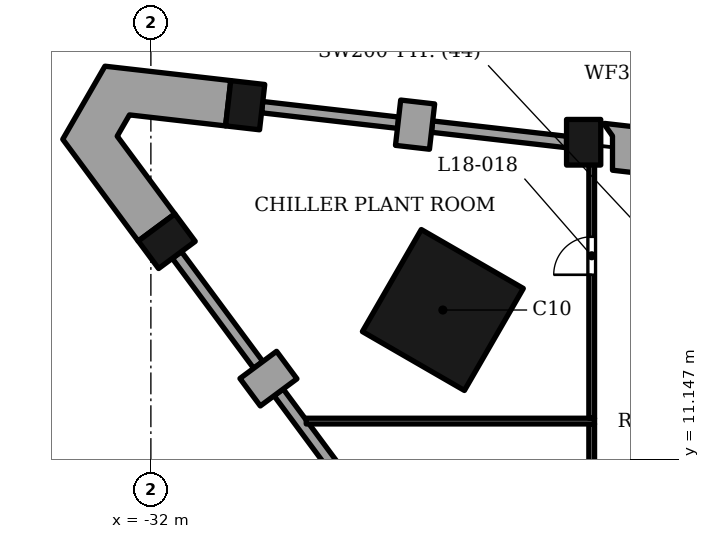
"""IFC4 building model, lengths in metres.
Left out: names, types, materials, properties, quantities, classifications, styles, units other than length and angle.
Written with IfcOpenShell. Run it as: python <this file> out.ifc"""

import sys

from ifc_helpers import new_model, si_unit, direction, frame, frame_2d, origin, origin_2d, place, context, subcontext, project, spatial, polyline, rectangle, outline, extrude, clip, halfspace, element, fill, save


model = new_model("IFC4")
c1 = context("Model", 3, precision=1e-05, world=origin(), true_north=direction((0.0, 1.0)))
c2 = subcontext(c1, "Body", "Model", "MODEL_VIEW")
j1 = project(units=[si_unit("LENGTHUNIT", "METRE"), si_unit("PLANEANGLEUNIT", "RADIAN")], contexts=[c1])
p1 = place(None, origin())
s1 = spatial("IfcSite", under=j1, at=p1, CompositionType="ELEMENT")
p2 = place(p1, origin())
s2 = spatial("IfcBuilding", under=s1, at=p2, CompositionType="ELEMENT")
p3 = place(p2, frame((0.0, 0.0, 86.8)))
s3 = spatial("IfcBuildingStorey", under=s2, at=p3, CompositionType="ELEMENT", Elevation=86.8)
for number, where, z_axis, x_axis in (
    (1, (-29.519, 20.462, 0.0), (0.0, 0.0, 1.0), (-0.994, 0.114, 0.0)),
    (2, (-31.583, 16.883, 0.0), (0.0, 0.0, 1.0), (0.595, -0.804, 0.0)),
):
    element("IfcColumn", number, at=place(p3, frame(where, z_axis=z_axis, x_axis=x_axis)), inside=s3, PredefinedType="COLUMN", context=c2, shape_type="SweptSolid", body=[
        extrude(rectangle(XDim=0.9, YDim=1.2, at=origin_2d()), origin(), (0.0, 0.0, 1.0), 5.0),
    ])
p4 = place(p3, frame((-24.317, 15.073, 0.0), z_axis=(0.0, 0.0, 1.0), x_axis=(0.866025412511, -0.499999984885, 0.0)))
e3 = element("IfcColumn", 3, at=p4, inside=s3, PredefinedType="COLUMN", context=c2, shape_type="SweptSolid", body=[
    extrude(rectangle(XDim=3.1, YDim=3.1, at=origin_2d()), origin(), (0.0, 0.0, 1.0), 5.0),
])
p5 = place(p3, frame((-20.612, 19.487, 0.0), z_axis=(0.061468302485, -0.086327521183, 0.994368747938), x_axis=(0.814599345858, 0.580024056162, 0.0)))
e4 = element("IfcColumn", 4, at=p5, inside=s3, PredefinedType="COLUMN", context=c2, shape_type="Clipping", body=[
    clip(clip(extrude(rectangle(XDim=0.9, YDim=1.2, at=origin_2d()), origin(), (0.0, 0.0, 1.0), 5.028), halfspace(frame((0.0, 0.0, 0.068), z_axis=(0.0, 0.0, 1.0), x_axis=(1.0, 0.0, 0.0)), True)), halfspace(frame((0.0, 0.0, 4.96), z_axis=(0.0, 0.0, 1.0), x_axis=(1.0, 0.0, 0.0)), False)),
])
p6 = place(p3, frame((-26.259, 9.556, 0.0), z_axis=(0.098413977447, 0.296911537989, 0.949820102784), x_axis=(-0.949215713653, 0.314626014428, 0.0)))
e5 = element("IfcColumn", 5, at=p6, inside=s3, PredefinedType="COLUMN", context=c2, shape_type="Clipping", body=[
    clip(clip(extrude(rectangle(XDim=0.9, YDim=1.2, at=origin_2d()), origin(), (0.0, 0.0, 1.0), 5.264), halfspace(frame((0.0, 0.0, 0.202), z_axis=(0.0, 0.0, 1.0), x_axis=(1.0, 0.0, 0.0)), True)), halfspace(frame((0.0, 0.0, 5.062), z_axis=(0.0, 0.0, 1.0), x_axis=(1.0, 0.0, 0.0)), False)),
])
p7 = place(p3, frame((-25.116, 19.354, 0.0), z_axis=(0.0, 0.0, 1.0), x_axis=(0.113735952551, 0.993511013073, 0.0)))
e6 = element("IfcWall", 6, at=p7, inside=s3, PredefinedType="SOLIDWALL", context=c2, shape_type="SweptSolid", body=[
    extrude(rectangle(XDim=1.2, YDim=0.9, at=frame_2d((0.6, 0.0))), origin(), (0.0, 0.0, 1.0), 3.5),
])
p8 = place(p3, origin())
e7 = element("IfcWall", 7, at=p8, inside=s3, PredefinedType="ELEMENTEDWALL", context=c2, shape_type="SweptSolid", body=[
    extrude(outline(polyline([(-24.618, 19.75), (-21.062, 19.343), (-21.062, 19.645), (-24.584, 20.048), (-24.618, 19.75)])), origin(), (0.0, 0.0, 1.0), 3.5),
])
p9 = place(p3, frame((-25.495, 20.001, 0.0), z_axis=(0.0, 0.0, 1.0), x_axis=(-0.993511890309, 0.113728289423, 0.0)))
e8 = element("IfcWall", 8, at=p9, inside=s3, PredefinedType="ELEMENTEDWALL", context=c2, shape_type="SweptSolid", body=[
    extrude(rectangle(XDim=3.6, YDim=0.3, at=frame_2d((1.8, 0.0))), origin(), (0.0, 0.0, 1.0), 3.5),
])
p10 = place(p3, frame((-29.388, 12.91, 0.0), z_axis=(0.0, 0.0, 1.0), x_axis=(0.803477891264, 0.595334593527, 0.0)))
e9 = element("IfcWall", 9, at=p10, inside=s3, PredefinedType="SOLIDWALL", context=c2, shape_type="SweptSolid", body=[
    extrude(rectangle(XDim=1.2, YDim=0.9, at=frame_2d((0.6, 0.0))), origin(), (0.0, 0.0, 1.0), 3.5),
])
p11 = place(p3, origin())
e10 = element("IfcWall", 10, at=p11, inside=s3, PredefinedType="ELEMENTEDWALL", context=c2, shape_type="SweptSolid", body=[
    extrude(outline(polyline([(-29.054, 13.718), (-31.196, 16.61), (-31.437, 16.431), (-29.295, 13.54), (-29.054, 13.718)])), origin(), (0.0, 0.0, 1.0), 3.5),
])
p12 = place(p3, origin())
e11 = element("IfcWall", 11, at=p12, inside=s3, PredefinedType="ELEMENTEDWALL", context=c2, shape_type="SweptSolid", body=[
    extrude(outline(polyline([(-28.759, 12.816), (-26.709, 10.049), (-26.709, 10.156), (-26.618, 10.43), (-28.518, 12.995), (-28.759, 12.816)])), origin(), (0.0, 0.0, 1.0), 3.5),
])
p13 = place(p3, origin())
e12 = element("IfcWall", 12, at=p13, inside=s3, PredefinedType="SOLIDWALL", context=c2, shape_type="SweptSolid", body=[
    extrude(outline(polyline([(-19.853, 18.751), (-18.0, 18.539), (-18.0, 19.052), (-17.21, 19.052), (-17.142, 19.649), (-20.062, 19.983), (-20.065, 19.951), (-19.853, 19.653), (-19.853, 18.751)])), origin(), (0.0, 0.0, 1.0), 3.5),
])
p14 = place(p3, origin())
e13 = element("IfcWall", 13, at=p14, inside=s3, PredefinedType="SOLIDWALL", context=c2, shape_type="SweptSolid", body=[
    extrude(outline(polyline([(-29.897, 21.109), (-33.209, 21.489), (-34.319, 19.565), (-32.335, 16.887), (-31.371, 17.602), (-32.886, 19.647), (-32.563, 20.207), (-30.034, 19.917), (-29.897, 21.109)])), origin(), (0.0, 0.0, 1.0), 3.5),
])
p15 = place(p3, frame((-20.4, 3.528, 0.0), z_axis=(0.0, 0.0, 1.0), x_axis=(0.0, 1.0, 0.0)))
e14 = element("IfcWall", 14, at=p15, inside=s3, PredefinedType="PARTITIONING", context=c2, shape_type="SweptSolid", body=[
    extrude(rectangle(XDim=8.548, YDim=0.15, at=frame_2d((4.274, 0.0))), origin(), (0.0, 0.0, 1.0), 4.05),
])
p16 = place(p15, frame((3.775, 0.0, 0.0)))
e15 = element("IfcOpeningElement", 15, at=p16, cuts=e14, PredefinedType="OPENING", context=c2, shape_type="SweptSolid", body=[
    extrude(rectangle(XDim=1.0, YDim=2.1, at=frame_2d((0.5, 1.05))), frame((0.0, 0.085, 0.0), z_axis=(0.0, -1.0, 0.0), x_axis=(1.0, 0.0, 0.0)), (0.0, 0.0, 1.0), 0.17),
])
p17 = place(p3, frame((-27.912, 12.15, 0.0), z_axis=(0.0, 0.0, 1.0), x_axis=(1.0, 0.0, 0.0)))
e16 = element("IfcWall", 16, at=p17, inside=s3, PredefinedType="PARTITIONING", context=c2, shape_type="SweptSolid", body=[
    extrude(rectangle(XDim=7.587, YDim=0.15, at=frame_2d((3.793, 0.0))), origin(), (0.0, 0.0, 1.0), 3.752),
])
p18 = place(p3, frame((-20.4, 12.225, 0.0), z_axis=(0.0, 0.0, 1.0), x_axis=(0.0, 1.0, 0.0)))
e17 = element("IfcWall", 17, at=p18, inside=s3, PredefinedType="PARTITIONING", context=c2, shape_type="SweptSolid", body=[
    extrude(rectangle(XDim=6.966, YDim=0.15, at=frame_2d((3.483, 0.0))), origin(), (0.0, 0.0, 1.0), 3.752),
])
p19 = place(p18, frame((3.775, 0.0, 0.0)))
e18 = element("IfcOpeningElement", 18, at=p19, cuts=e17, PredefinedType="OPENING", context=c2, shape_type="SweptSolid", body=[
    extrude(rectangle(XDim=1.0, YDim=2.1, at=frame_2d((0.5, 1.05))), frame((0.0, 0.085, 0.0), z_axis=(0.0, -1.0, 0.0), x_axis=(1.0, 0.0, 0.0)), (0.0, 0.0, 1.0), 0.17),
])
p20 = place(p19, origin())
e19 = element("IfcDoor", 19, at=p20, inside=s3, OperationType="SINGLE_SWING_LEFT", PredefinedType="DOOR", context=c2, shape_type="SweptSolid", body=[
    extrude(rectangle(XDim=1.0, YDim=2.1, at=frame_2d((0.5, 1.05))), frame((0.0, 0.025, 0.0), z_axis=(0.0, -1.0, 0.0), x_axis=(1.0, 0.0, 0.0)), (0.0, 0.0, 1.0), 0.05),
])
fill(e18, e19)
save(model, sys.argv[1])
